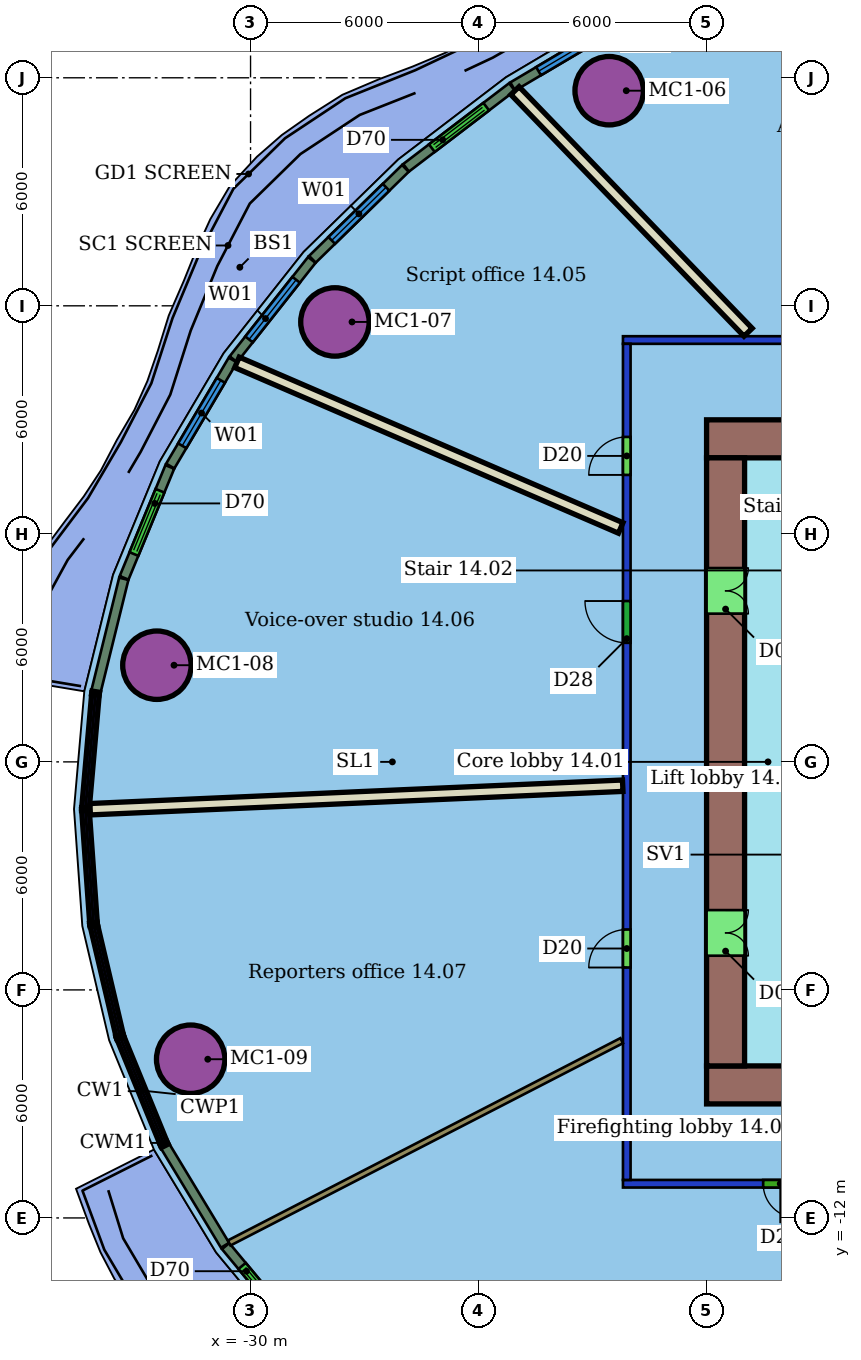
"""IFC4 building model, lengths in metres.
Left out: names, types, materials, properties, quantities, classifications, styles, units other than length and angle.
Written with IfcOpenShell. Run it as: python <this file> out.ifc"""

import sys

from ifc_helpers import new_model, si_unit, direction, frame, frame_2d, origin, origin_2d, place, context, subcontext, project, spatial, rectangle, hollow_circle, extrude, element, fill, save


model = new_model("IFC4")
c1 = context("Model", 3, precision=1e-05, world=origin(), true_north=direction((0.0, 1.0)))
c2 = subcontext(c1, "Body", "Model", "MODEL_VIEW")
j1 = project(units=[si_unit("LENGTHUNIT", "METRE"), si_unit("PLANEANGLEUNIT", "RADIAN")], contexts=[c1])
p1 = place(None, origin())
s1 = spatial("IfcSite", under=j1, at=p1, CompositionType="ELEMENT")
p2 = place(p1, origin())
s2 = spatial("IfcBuilding", under=s1, at=p2, CompositionType="ELEMENT")
p3 = place(p2, frame((0.0, 0.0, 69.3)))
s3 = spatial("IfcBuildingStorey", under=s2, at=p3, CompositionType="ELEMENT", Elevation=69.3)
for number, where, z_axis, x_axis in (
    (1, (-20.563, 17.66, 0.0), (0.0, 0.0, 1.0), (1.0, 0.0, 0.0)),
    (2, (-27.78, 11.576, 0.0), (0.0, 0.0, 1.0), (1.0, 0.0, 0.0)),
    (3, (-32.464, 2.543, 0.0), (0.0, 0.0, 1.0), (1.0, 0.0, 0.0)),
    (4, (-31.575, -7.824, 0.0), (0.0, 0.0, 1.0), (1.0, 0.0, 0.0)),
):
    element("IfcColumn", number, at=place(p3, frame(where, z_axis=z_axis, x_axis=x_axis)), inside=s3, PredefinedType="COLUMN", context=c2, shape_type="SweptSolid", body=[
        extrude(hollow_circle(Radius=0.9, WallThickness=0.06, at=origin_2d()), origin(), (0.0, 0.0, 1.0), 3.55),
    ])
p4 = place(p3, frame((8.2, -11.1, 0.0), z_axis=(0.0, 0.0, 1.0), x_axis=(-1.0, 0.0, 0.0)))
e5 = element("IfcWall", 5, at=p4, inside=s3, PredefinedType="PARTITIONING", context=c2, shape_type="SweptSolid", body=[
    extrude(rectangle(XDim=28.4, YDim=0.2, at=frame_2d((14.2, 0.0))), origin(), (0.0, 0.0, 1.0), 2.85),
])
p5 = place(p4, frame((23.811, 0.0, 0.0)))
e6 = element("IfcOpeningElement", 6, at=p5, cuts=e5, PredefinedType="OPENING", context=c2, shape_type="SweptSolid", body=[
    extrude(rectangle(XDim=0.9, YDim=2.1, at=frame_2d((0.45, 1.05))), frame((0.0, 0.11, 0.0), z_axis=(0.0, -1.0, 0.0), x_axis=(1.0, 0.0, 0.0)), (0.0, 0.0, 1.0), 0.22),
])
p6 = place(p4, frame((19.218, 0.0, 0.0)))
e7 = element("IfcOpeningElement", 7, at=p6, cuts=e5, PredefinedType="OPENING", context=c2, shape_type="SweptSolid", body=[
    extrude(rectangle(XDim=1.1, YDim=2.1, at=frame_2d((0.55, 1.05))), frame((0.0, 0.11, 0.0), z_axis=(0.0, -1.0, 0.0), x_axis=(1.0, 0.0, 0.0)), (0.0, 0.0, 1.0), 0.22),
])
p7 = place(p4, frame((14.111, 0.0, 0.0)))
e8 = element("IfcOpeningElement", 8, at=p7, cuts=e5, PredefinedType="OPENING", context=c2, shape_type="SweptSolid", body=[
    extrude(rectangle(XDim=1.0, YDim=2.1, at=frame_2d((0.5, 1.05))), frame((0.0, 0.11, 0.0), z_axis=(0.0, -1.0, 0.0), x_axis=(1.0, 0.0, 0.0)), (0.0, 0.0, 1.0), 0.22),
])
p8 = place(p4, frame((7.977, 0.0, 0.0)))
e9 = element("IfcOpeningElement", 9, at=p8, cuts=e5, PredefinedType="OPENING", context=c2, shape_type="SweptSolid", body=[
    extrude(rectangle(XDim=1.0, YDim=2.1, at=frame_2d((0.5, 1.05))), frame((0.0, 0.11, 0.0), z_axis=(0.0, -1.0, 0.0), x_axis=(1.0, 0.0, 0.0)), (0.0, 0.0, 1.0), 0.22),
])
p9 = place(p4, frame((3.287, 0.0, 0.0)))
e10 = element("IfcOpeningElement", 10, at=p9, cuts=e5, PredefinedType="OPENING", context=c2, shape_type="SweptSolid", body=[
    extrude(rectangle(XDim=1.2, YDim=2.1, at=frame_2d((0.6, 1.05))), frame((0.0, 0.11, 0.0), z_axis=(0.0, -1.0, 0.0), x_axis=(1.0, 0.0, 0.0)), (0.0, 0.0, 1.0), 0.22),
])
p10 = place(p3, frame((-20.1, -11.0, 0.0), z_axis=(0.0, 0.0, 1.0), x_axis=(0.0, 1.0, 0.0)))
e11 = element("IfcWall", 11, at=p10, inside=s3, PredefinedType="PARTITIONING", context=c2, shape_type="SweptSolid", body=[
    extrude(rectangle(XDim=22.0, YDim=0.2, at=frame_2d((11.0, 0.0))), origin(), (0.0, 0.0, 1.0), 2.85),
])
p11 = place(p10, frame((18.55, 0.0, 0.0)))
e12 = element("IfcOpeningElement", 12, at=p11, cuts=e11, PredefinedType="OPENING", context=c2, shape_type="SweptSolid", body=[
    extrude(rectangle(XDim=1.0, YDim=2.1, at=frame_2d((0.5, 1.05))), frame((0.0, 0.11, 0.0), z_axis=(0.0, -1.0, 0.0), x_axis=(1.0, 0.0, 0.0)), (0.0, 0.0, 1.0), 0.22),
])
p12 = place(p10, frame((14.132, 0.0, 0.0)))
e13 = element("IfcOpeningElement", 13, at=p12, cuts=e11, PredefinedType="OPENING", context=c2, shape_type="SweptSolid", body=[
    extrude(rectangle(XDim=1.1, YDim=2.1, at=frame_2d((0.55, 1.05))), frame((0.0, 0.11, 0.0), z_axis=(0.0, -1.0, 0.0), x_axis=(1.0, 0.0, 0.0)), (0.0, 0.0, 1.0), 0.22),
])
p13 = place(p10, frame((5.589, 0.0, 0.0)))
e14 = element("IfcOpeningElement", 14, at=p13, cuts=e11, PredefinedType="OPENING", context=c2, shape_type="SweptSolid", body=[
    extrude(rectangle(XDim=1.0, YDim=2.1, at=frame_2d((0.5, 1.05))), frame((0.0, 0.11, 0.0), z_axis=(0.0, -1.0, 0.0), x_axis=(1.0, 0.0, 0.0)), (0.0, 0.0, 1.0), 0.22),
])
p14 = place(p3, frame((-20.2, 11.1, 0.0), z_axis=(0.0, 0.0, 1.0), x_axis=(1.0, 0.0, 0.0)))
e15 = element("IfcWall", 15, at=p14, inside=s3, PredefinedType="PARTITIONING", context=c2, shape_type="SweptSolid", body=[
    extrude(rectangle(XDim=28.4, YDim=0.2, at=frame_2d((14.2, 0.0))), origin(), (0.0, 0.0, 1.0), 2.85),
])
p15 = place(p14, frame((25.412, 0.0, 0.0)))
e16 = element("IfcOpeningElement", 16, at=p15, cuts=e15, PredefinedType="OPENING", context=c2, shape_type="SweptSolid", body=[
    extrude(rectangle(XDim=1.2, YDim=2.1, at=frame_2d((0.6, 1.05))), frame((0.0, 0.11, 0.0), z_axis=(0.0, -1.0, 0.0), x_axis=(1.0, 0.0, 0.0)), (0.0, 0.0, 1.0), 0.22),
])
p16 = place(p14, frame((19.744, 0.0, 0.0)))
e17 = element("IfcOpeningElement", 17, at=p16, cuts=e15, PredefinedType="OPENING", context=c2, shape_type="SweptSolid", body=[
    extrude(rectangle(XDim=1.0, YDim=2.1, at=frame_2d((0.5, 1.05))), frame((0.0, 0.11, 0.0), z_axis=(0.0, -1.0, 0.0), x_axis=(1.0, 0.0, 0.0)), (0.0, 0.0, 1.0), 0.22),
])
p17 = place(p14, frame((15.997, 0.0, 0.0)))
e18 = element("IfcOpeningElement", 18, at=p17, cuts=e15, PredefinedType="OPENING", context=c2, shape_type="SweptSolid", body=[
    extrude(rectangle(XDim=0.9, YDim=2.1, at=frame_2d((0.45, 1.05))), frame((0.0, 0.11, 0.0), z_axis=(0.0, -1.0, 0.0), x_axis=(1.0, 0.0, 0.0)), (0.0, 0.0, 1.0), 0.22),
])
p18 = place(p14, frame((6.537, 0.0, 0.0)))
e19 = element("IfcOpeningElement", 19, at=p18, cuts=e15, PredefinedType="OPENING", context=c2, shape_type="SweptSolid", body=[
    extrude(rectangle(XDim=1.1, YDim=2.1, at=frame_2d((0.55, 1.05))), frame((0.0, 0.11, 0.0), z_axis=(0.0, -1.0, 0.0), x_axis=(1.0, 0.0, 0.0)), (0.0, 0.0, 1.0), 0.22),
])
p19 = place(p3, frame((-23.041, 17.661, 0.0), z_axis=(0.0, 0.0, 1.0), x_axis=(0.694363649844, -0.719624292097, 0.0)))
e20 = element("IfcWall", 20, at=p19, inside=s3, PredefinedType="PARTITIONING", context=c2, shape_type="SweptSolid", body=[
    extrude(rectangle(XDim=8.834, YDim=0.3, at=frame_2d((4.417, 0.0))), origin(), (0.0, 0.0, 1.0), 3.55),
])
p20 = place(p3, frame((-30.357, 10.513, 0.0), z_axis=(0.0, 0.0, 1.0), x_axis=(0.918123488596, -0.396294410368, 0.0)))
e21 = element("IfcWall", 21, at=p20, inside=s3, PredefinedType="PARTITIONING", context=c2, shape_type="SweptSolid", body=[
    extrude(rectangle(XDim=10.998, YDim=0.3, at=frame_2d((5.499, 0.0))), origin(), (0.0, 0.0, 1.0), 3.55),
])
p21 = place(p3, frame((-34.221, -1.246, 0.0), z_axis=(0.0, 0.0, 1.0), x_axis=(0.999027039991, 0.044101852189, 0.0)))
e22 = element("IfcWall", 22, at=p21, inside=s3, PredefinedType="PARTITIONING", context=c2, shape_type="SweptSolid", body=[
    extrude(rectangle(XDim=14.028, YDim=0.3, at=frame_2d((7.014, 0.0))), origin(), (0.0, 0.0, 1.0), 3.55),
])
p22 = place(p3, frame((-30.562, -12.658, 0.0), z_axis=(0.0, 0.0, 1.0), x_axis=(0.888901442765, 0.458098488375, 0.0)))
e23 = element("IfcWall", 23, at=p22, inside=s3, PredefinedType="PARTITIONING", context=c2, shape_type="SweptSolid", body=[
    extrude(rectangle(XDim=11.619, YDim=0.15, at=frame_2d((5.809, 0.0))), origin(), (0.0, 0.0, 1.0), 3.55),
])
p23 = place(p3, frame((-20.327, -20.72, 0.0), z_axis=(0.0, 0.0, 1.0), x_axis=(0.568736200027, 0.822519990504, 0.0)))
e24 = element("IfcWall", 24, at=p23, inside=s3, PredefinedType="PARTITIONING", context=c2, shape_type="SweptSolid", body=[
    extrude(rectangle(XDim=11.471, YDim=0.3, at=frame_2d((5.735, 0.0))), origin(), (0.0, 0.0, 1.0), 3.55),
])
p24 = place(p3, frame((-20.02, 19.596, 0.0), z_axis=(0.0, 0.0, 1.0), x_axis=(-0.860342460641, -0.509716441188, 0.0)))
e25 = element("IfcWall", 25, at=p24, inside=s3, PredefinedType="SOLIDWALL", context=c2, shape_type="SweptSolid", body=[
    extrude(rectangle(XDim=3.582, YDim=0.25, at=frame_2d((1.791, 0.0))), origin(), (0.0, 0.0, 1.0), 3.15),
])
p25 = place(p24, frame((0.791, 0.0, 0.8)))
e26 = element("IfcOpeningElement", 26, at=p25, cuts=e25, PredefinedType="OPENING", context=c2, shape_type="SweptSolid", body=[
    extrude(rectangle(XDim=2.0, YDim=2.2, at=frame_2d((1.0, 1.1))), frame((0.0, 0.135, 0.0), z_axis=(0.0, -1.0, 0.0), x_axis=(1.0, 0.0, 0.0)), (0.0, 0.0, 1.0), 0.27),
])
p26 = place(p3, frame((-23.12, 17.758, 0.0), z_axis=(0.0, 0.0, 1.0), x_axis=(-0.795035183211, -0.60656331694, 0.0)))
e27 = element("IfcWall", 27, at=p26, inside=s3, PredefinedType="SOLIDWALL", context=c2, shape_type="SweptSolid", body=[
    extrude(rectangle(XDim=3.507, YDim=0.25, at=frame_2d((1.753, 0.0))), origin(), (0.0, 0.0, 1.0), 3.15),
])
p27 = place(p26, frame((0.853, 0.0, 0.0)))
e28 = element("IfcOpeningElement", 28, at=p27, cuts=e27, PredefinedType="OPENING", context=c2, shape_type="SweptSolid", body=[
    extrude(rectangle(XDim=1.8, YDim=2.4, at=frame_2d((0.9, 1.2))), frame((0.0, 0.135, 0.0), z_axis=(0.0, -1.0, 0.0), x_axis=(1.0, 0.0, 0.0)), (0.0, 0.0, 1.0), 0.27),
])
p28 = place(p3, frame((-25.926, 15.616, 0.0), z_axis=(0.0, 0.0, 1.0), x_axis=(-0.715230982257, -0.698888147001, 0.0)))
e29 = element("IfcWall", 29, at=p28, inside=s3, PredefinedType="SOLIDWALL", context=c2, shape_type="SweptSolid", body=[
    extrude(rectangle(XDim=3.421, YDim=0.25, at=frame_2d((1.71, 0.0))), origin(), (0.0, 0.0, 1.0), 3.15),
])
p29 = place(p28, frame((0.71, 0.0, 0.8)))
e30 = element("IfcOpeningElement", 30, at=p29, cuts=e29, PredefinedType="OPENING", context=c2, shape_type="SweptSolid", body=[
    extrude(rectangle(XDim=2.0, YDim=2.2, at=frame_2d((1.0, 1.1))), frame((0.0, 0.135, 0.0), z_axis=(0.0, -1.0, 0.0), x_axis=(1.0, 0.0, 0.0)), (0.0, 0.0, 1.0), 0.27),
])
p30 = place(p3, frame((-28.388, 13.207, 0.0), z_axis=(0.0, 0.0, 1.0), x_axis=(-0.619836825524, -0.784730724341, 0.0)))
e31 = element("IfcWall", 31, at=p30, inside=s3, PredefinedType="SOLIDWALL", context=c2, shape_type="SweptSolid", body=[
    extrude(rectangle(XDim=3.33, YDim=0.25, at=frame_2d((1.665, 0.0))), origin(), (0.0, 0.0, 1.0), 3.15),
])
p31 = place(p30, frame((0.665, 0.0, 0.8)))
e32 = element("IfcOpeningElement", 32, at=p31, cuts=e31, PredefinedType="OPENING", context=c2, shape_type="SweptSolid", body=[
    extrude(rectangle(XDim=2.0, YDim=2.2, at=frame_2d((1.0, 1.1))), frame((0.0, 0.135, 0.0), z_axis=(0.0, -1.0, 0.0), x_axis=(1.0, 0.0, 0.0)), (0.0, 0.0, 1.0), 0.27),
])
p32 = place(p3, frame((-30.466, 10.573, 0.0), z_axis=(0.0, 0.0, 1.0), x_axis=(-0.508376359917, -0.861134993295, 0.0)))
e33 = element("IfcWall", 33, at=p32, inside=s3, PredefinedType="SOLIDWALL", context=c2, shape_type="SweptSolid", body=[
    extrude(rectangle(XDim=3.24, YDim=0.25, at=frame_2d((1.62, 0.0))), origin(), (0.0, 0.0, 1.0), 3.15),
])
p33 = place(p32, frame((0.62, 0.0, 0.8)))
e34 = element("IfcOpeningElement", 34, at=p33, cuts=e33, PredefinedType="OPENING", context=c2, shape_type="SweptSolid", body=[
    extrude(rectangle(XDim=2.0, YDim=2.2, at=frame_2d((1.0, 1.1))), frame((0.0, 0.135, 0.0), z_axis=(0.0, -1.0, 0.0), x_axis=(1.0, 0.0, 0.0)), (0.0, 0.0, 1.0), 0.27),
])
p34 = place(p3, frame((-32.125, 7.76, 0.0), z_axis=(0.0, 0.0, 1.0), x_axis=(-0.381026005506, -0.924564320709, 0.0)))
e35 = element("IfcWall", 35, at=p34, inside=s3, PredefinedType="SOLIDWALL", context=c2, shape_type="SweptSolid", body=[
    extrude(rectangle(XDim=3.156, YDim=0.25, at=frame_2d((1.578, 0.0))), origin(), (0.0, 0.0, 1.0), 3.15),
])
p35 = place(p34, frame((0.678, 0.0, 0.0)))
e36 = element("IfcOpeningElement", 36, at=p35, cuts=e35, PredefinedType="OPENING", context=c2, shape_type="SweptSolid", body=[
    extrude(rectangle(XDim=1.8, YDim=2.4, at=frame_2d((0.9, 1.2))), frame((0.0, 0.135, 0.0), z_axis=(0.0, -1.0, 0.0), x_axis=(1.0, 0.0, 0.0)), (0.0, 0.0, 1.0), 0.27),
])
p36 = place(p3, frame((-33.336, 4.817, 0.0), z_axis=(0.0, 0.0, 1.0), x_axis=(-0.239572615753, -0.97087844851, 0.0)))
e37 = element("IfcWall", 37, at=p36, inside=s3, PredefinedType="SOLIDWALL", context=c2, shape_type="SweptSolid", body=[
    extrude(rectangle(XDim=3.045, YDim=0.25, at=frame_2d((1.522, 0.0))), origin(), (0.0, 0.0, 1.0), 3.15),
])
p37 = place(p3, frame((-32.246, -10.113, 0.0), z_axis=(0.0, 0.0, 1.0), x_axis=(0.517204963357, -0.855861569343, 0.0)))
e38 = element("IfcWall", 38, at=p37, inside=s3, PredefinedType="SOLIDWALL", context=c2, shape_type="SweptSolid", body=[
    extrude(rectangle(XDim=3.045, YDim=0.25, at=frame_2d((1.522, 0.0))), origin(), (0.0, 0.0, 1.0), 3.15),
])
p38 = place(p3, frame((-30.656, -12.741, 0.0), z_axis=(0.0, 0.0, 1.0), x_axis=(0.638501311246, -0.769620734867, 0.0)))
e39 = element("IfcWall", 39, at=p38, inside=s3, PredefinedType="SOLIDWALL", context=c2, shape_type="SweptSolid", body=[
    extrude(rectangle(XDim=3.156, YDim=0.25, at=frame_2d((1.578, 0.0))), origin(), (0.0, 0.0, 1.0), 3.15),
])
p39 = place(p38, frame((0.678, 0.0, 0.0)))
e40 = element("IfcOpeningElement", 40, at=p39, cuts=e39, PredefinedType="OPENING", context=c2, shape_type="SweptSolid", body=[
    extrude(rectangle(XDim=1.8, YDim=2.4, at=frame_2d((0.9, 1.2))), frame((0.0, 0.135, 0.0), z_axis=(0.0, -1.0, 0.0), x_axis=(1.0, 0.0, 0.0)), (0.0, 0.0, 1.0), 0.27),
])
p40 = place(p3, frame((-6.0, 8.5, 0.0), z_axis=(0.0, 0.0, 1.0), x_axis=(-1.0, 0.0, 0.0)))
e41 = element("IfcWall", 41, at=p40, inside=s3, PredefinedType="SHEAR", context=c2, shape_type="SweptSolid", body=[
    extrude(rectangle(XDim=12.0, YDim=1.0, at=frame_2d((6.0, 0.0))), origin(), (0.0, 0.0, 1.0), 3.4),
])
p41 = place(p40, frame((5.2, 0.0, 0.0)))
e42 = element("IfcOpeningElement", 42, at=p41, cuts=e41, PredefinedType="OPENING", context=c2, shape_type="SweptSolid", body=[
    extrude(rectangle(XDim=1.2, YDim=2.1, at=frame_2d((0.6, 1.05))), frame((0.0, 0.51, 0.0), z_axis=(0.0, -1.0, 0.0), x_axis=(1.0, 0.0, 0.0)), (0.0, 0.0, 1.0), 1.02),
])
p42 = place(p3, frame((-18.0, -8.5, 0.0), z_axis=(0.0, 0.0, 1.0), x_axis=(1.0, 0.0, 0.0)))
e43 = element("IfcWall", 43, at=p42, inside=s3, PredefinedType="SHEAR", context=c2, shape_type="SweptSolid", body=[
    extrude(rectangle(XDim=24.0, YDim=1.0, at=frame_2d((12.0, 0.0))), origin(), (0.0, 0.0, 1.0), 3.4),
])
p43 = place(p42, frame((6.0, 0.0, 0.0)))
e44 = element("IfcOpeningElement", 44, at=p43, cuts=e43, PredefinedType="OPENING", context=c2, shape_type="SweptSolid", body=[
    extrude(rectangle(XDim=1.2, YDim=2.1, at=frame_2d((0.6, 1.05))), frame((0.0, 0.51, 0.0), z_axis=(0.0, -1.0, 0.0), x_axis=(1.0, 0.0, 0.0)), (0.0, 0.0, 1.0), 1.02),
])
p44 = place(p3, frame((-17.5, 8.0, 0.0), z_axis=(0.0, 0.0, 1.0), x_axis=(0.0, -1.0, 0.0)))
e45 = element("IfcWall", 45, at=p44, inside=s3, PredefinedType="SHEAR", context=c2, shape_type="SweptSolid", body=[
    extrude(rectangle(XDim=16.0, YDim=1.0, at=frame_2d((8.0, 0.0))), origin(), (0.0, 0.0, 1.0), 3.4),
])
p45 = place(p44, frame((11.9, 0.0, 0.0)))
e46 = element("IfcOpeningElement", 46, at=p45, cuts=e45, PredefinedType="OPENING", context=c2, shape_type="SweptSolid", body=[
    extrude(rectangle(XDim=1.2, YDim=2.1, at=frame_2d((0.6, 1.05))), frame((0.0, 0.51, 0.0), z_axis=(0.0, -1.0, 0.0), x_axis=(1.0, 0.0, 0.0)), (0.0, 0.0, 1.0), 1.02),
])
p46 = place(p44, frame((2.9, 0.0, 0.0)))
e47 = element("IfcOpeningElement", 47, at=p46, cuts=e45, PredefinedType="OPENING", context=c2, shape_type="SweptSolid", body=[
    extrude(rectangle(XDim=1.2, YDim=2.1, at=frame_2d((0.6, 1.05))), frame((0.0, 0.51, 0.0), z_axis=(0.0, -1.0, 0.0), x_axis=(1.0, 0.0, 0.0)), (0.0, 0.0, 1.0), 1.02),
])
p47 = place(p11, origin())
e48 = element("IfcDoor", 48, at=p47, inside=s3, OperationType="SINGLE_SWING_LEFT", PredefinedType="DOOR", context=c2, shape_type="SweptSolid", body=[
    extrude(rectangle(XDim=1.0, YDim=2.1, at=frame_2d((0.5, 1.05))), frame((0.0, 0.025, 0.0), z_axis=(0.0, -1.0, 0.0), x_axis=(1.0, 0.0, 0.0)), (0.0, 0.0, 1.0), 0.05),
])
fill(e12, e48)
p48 = place(p12, origin())
e49 = element("IfcDoor", 49, at=p48, inside=s3, OperationType="SINGLE_SWING_RIGHT", PredefinedType="DOOR", context=c2, shape_type="SweptSolid", body=[
    extrude(rectangle(XDim=1.1, YDim=2.1, at=frame_2d((0.55, 1.05))), frame((0.0, 0.025, 0.0), z_axis=(0.0, -1.0, 0.0), x_axis=(1.0, 0.0, 0.0)), (0.0, 0.0, 1.0), 0.05),
])
fill(e13, e49)
p49 = place(p13, origin())
e50 = element("IfcDoor", 50, at=p49, inside=s3, OperationType="SINGLE_SWING_LEFT", PredefinedType="DOOR", context=c2, shape_type="SweptSolid", body=[
    extrude(rectangle(XDim=1.0, YDim=2.1, at=frame_2d((0.5, 1.05))), frame((0.0, 0.025, 0.0), z_axis=(0.0, -1.0, 0.0), x_axis=(1.0, 0.0, 0.0)), (0.0, 0.0, 1.0), 0.05),
])
fill(e14, e50)
p50 = place(p5, origin())
e51 = element("IfcDoor", 51, at=p50, inside=s3, OperationType="SINGLE_SWING_LEFT", PredefinedType="DOOR", context=c2, shape_type="SweptSolid", body=[
    extrude(rectangle(XDim=0.9, YDim=2.1, at=frame_2d((0.45, 1.05))), frame((0.0, 0.025, 0.0), z_axis=(0.0, -1.0, 0.0), x_axis=(1.0, 0.0, 0.0)), (0.0, 0.0, 1.0), 0.05),
])
fill(e6, e51)
p51 = place(p25, origin())
e52 = element("IfcWindow", 52, at=p51, inside=s3, PartitioningType="SINGLE_PANEL", PredefinedType="WINDOW", context=c2, shape_type="SweptSolid", body=[
    extrude(rectangle(XDim=2.0, YDim=2.2, at=frame_2d((1.0, 1.1))), frame((0.0, 0.03, 0.0), z_axis=(0.0, -1.0, 0.0), x_axis=(1.0, 0.0, 0.0)), (0.0, 0.0, 1.0), 0.06),
])
fill(e26, e52)
p52 = place(p27, origin())
e53 = element("IfcDoor", 53, at=p52, inside=s3, OperationType="DOUBLE_DOOR_SLIDING", PredefinedType="DOOR", context=c2, shape_type="SweptSolid", body=[
    extrude(rectangle(XDim=1.8, YDim=2.4, at=frame_2d((0.9, 1.2))), frame((0.0, 0.025, 0.0), z_axis=(0.0, -1.0, 0.0), x_axis=(1.0, 0.0, 0.0)), (0.0, 0.0, 1.0), 0.05),
])
fill(e28, e53)
p53 = place(p29, origin())
e54 = element("IfcWindow", 54, at=p53, inside=s3, PartitioningType="SINGLE_PANEL", PredefinedType="WINDOW", context=c2, shape_type="SweptSolid", body=[
    extrude(rectangle(XDim=2.0, YDim=2.2, at=frame_2d((1.0, 1.1))), frame((0.0, 0.03, 0.0), z_axis=(0.0, -1.0, 0.0), x_axis=(1.0, 0.0, 0.0)), (0.0, 0.0, 1.0), 0.06),
])
fill(e30, e54)
p54 = place(p31, origin())
e55 = element("IfcWindow", 55, at=p54, inside=s3, PartitioningType="SINGLE_PANEL", PredefinedType="WINDOW", context=c2, shape_type="SweptSolid", body=[
    extrude(rectangle(XDim=2.0, YDim=2.2, at=frame_2d((1.0, 1.1))), frame((0.0, 0.03, 0.0), z_axis=(0.0, -1.0, 0.0), x_axis=(1.0, 0.0, 0.0)), (0.0, 0.0, 1.0), 0.06),
])
fill(e32, e55)
p55 = place(p33, origin())
e56 = element("IfcWindow", 56, at=p55, inside=s3, PartitioningType="SINGLE_PANEL", PredefinedType="WINDOW", context=c2, shape_type="SweptSolid", body=[
    extrude(rectangle(XDim=2.0, YDim=2.2, at=frame_2d((1.0, 1.1))), frame((0.0, 0.03, 0.0), z_axis=(0.0, -1.0, 0.0), x_axis=(1.0, 0.0, 0.0)), (0.0, 0.0, 1.0), 0.06),
])
fill(e34, e56)
p56 = place(p35, origin())
e57 = element("IfcDoor", 57, at=p56, inside=s3, OperationType="DOUBLE_DOOR_SLIDING", PredefinedType="DOOR", context=c2, shape_type="SweptSolid", body=[
    extrude(rectangle(XDim=1.8, YDim=2.4, at=frame_2d((0.9, 1.2))), frame((0.0, 0.025, 0.0), z_axis=(0.0, -1.0, 0.0), x_axis=(1.0, 0.0, 0.0)), (0.0, 0.0, 1.0), 0.05),
])
fill(e36, e57)
p57 = place(p39, origin())
e58 = element("IfcDoor", 58, at=p57, inside=s3, OperationType="DOUBLE_DOOR_SLIDING", PredefinedType="DOOR", context=c2, shape_type="SweptSolid", body=[
    extrude(rectangle(XDim=1.8, YDim=2.4, at=frame_2d((0.9, 1.2))), frame((0.0, 0.025, 0.0), z_axis=(0.0, -1.0, 0.0), x_axis=(1.0, 0.0, 0.0)), (0.0, 0.0, 1.0), 0.05),
])
fill(e40, e58)
p58 = place(p45, origin())
e59 = element("IfcDoor", 59, at=p58, inside=s3, OperationType="DOUBLE_DOOR_SINGLE_SWING", PredefinedType="NOTDEFINED", context=c2, shape_type="SweptSolid", body=[
    extrude(rectangle(XDim=1.2, YDim=2.1, at=frame_2d((0.6, 1.05))), frame((0.0, 0.025, 0.0), z_axis=(0.0, -1.0, 0.0), x_axis=(1.0, 0.0, 0.0)), (0.0, 0.0, 1.0), 0.05),
])
fill(e46, e59)
p59 = place(p46, origin())
e60 = element("IfcDoor", 60, at=p59, inside=s3, OperationType="DOUBLE_DOOR_SINGLE_SWING", PredefinedType="NOTDEFINED", context=c2, shape_type="SweptSolid", body=[
    extrude(rectangle(XDim=1.2, YDim=2.1, at=frame_2d((0.6, 1.05))), frame((0.0, 0.025, 0.0), z_axis=(0.0, -1.0, 0.0), x_axis=(1.0, 0.0, 0.0)), (0.0, 0.0, 1.0), 0.05),
])
fill(e47, e60)
save(model, sys.argv[1])
